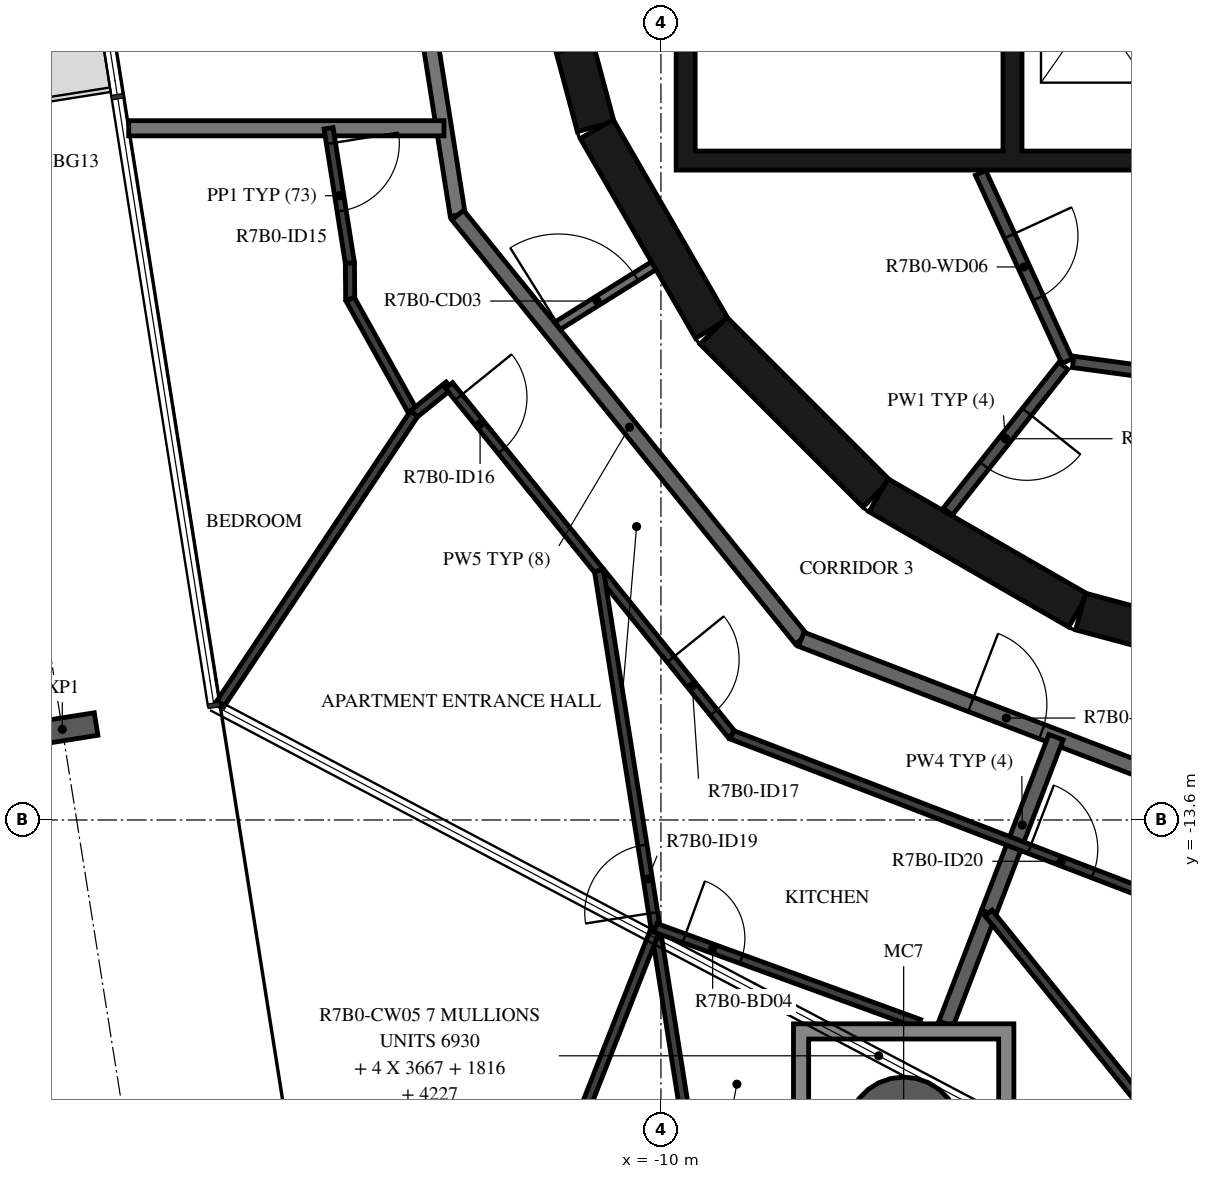
"""IFC4 building model, lengths in metres.
Left out: names, types, materials, properties, quantities, classifications, styles, units other than length and angle.
Written with IfcOpenShell. Run it as: python <this file> out.ifc"""

import sys

from ifc_helpers import new_model, si_unit, direction, frame, frame_2d, origin, origin_2d, place, context, subcontext, project, spatial, polyline, rectangle, hollow_circle, i_section, outline, extrude, element, fill, save


model = new_model("IFC4")
c1 = context("Model", 3, precision=1e-05, world=origin(), true_north=direction((0.0, 1.0)))
c2 = subcontext(c1, "Body", "Model", "MODEL_VIEW")
j1 = project(units=[si_unit("LENGTHUNIT", "METRE"), si_unit("PLANEANGLEUNIT", "RADIAN")], contexts=[c1])
p1 = place(None, origin())
s1 = spatial("IfcSite", under=j1, at=p1, CompositionType="ELEMENT")
p2 = place(p1, origin())
s2 = spatial("IfcBuilding", under=s1, at=p2, CompositionType="ELEMENT")
p3 = place(p2, frame((0.0, 0.0, 277.4)))
s3 = spatial("IfcBuildingStorey", under=s2, at=p3, CompositionType="ELEMENT", Elevation=277.4)
p4 = place(p3, frame((-6.807, -17.732, -0.38), z_axis=(0.0, 0.0, 1.0), x_axis=(1.0, 0.0, 0.0)))
e1 = element("IfcColumn", 1, at=p4, inside=s3, PredefinedType="COLUMN", context=c2, shape_type="SweptSolid", body=[
    extrude(hollow_circle(Radius=0.75, WallThickness=0.035, at=origin_2d()), origin(), (0.0, 0.0, 1.0), 3.5),
])
p5 = place(p3, frame((-17.875, -12.408, -0.38), z_axis=(0.0, 0.0, 1.0), x_axis=(-0.156434064006, 0.987688404113, 0.0)))
e2 = element("IfcColumn", 2, at=p5, inside=s3, PredefinedType="COLUMN", context=c2, shape_type="SweptSolid", body=[
    extrude(i_section(OverallWidth=0.3, OverallDepth=0.9, WebThickness=0.019, FlangeThickness=0.035, FilletRadius=0.03, at=origin_2d()), origin(), (0.0, 0.0, 1.0), 3.5),
])
p6 = place(p3, frame((-11.643, -1.55, 0.0), z_axis=(0.0, 0.0, 1.0), x_axis=(0.258734743916, -0.965948410781, 0.0)))
e3 = element("IfcWall", 3, at=p6, inside=s3, PredefinedType="SHEAR", context=c2, shape_type="SweptSolid", body=[
    extrude(rectangle(XDim=3.033, YDim=0.5, at=frame_2d((1.516, 0.0))), origin(), (0.0, 0.0, 1.0), 3.12),
])
p7 = place(p6, frame((1.066, 0.0, 0.0)))
e4 = element("IfcOpeningElement", 4, at=p7, cuts=e3, PredefinedType="OPENING", context=c2, shape_type="SweptSolid", body=[
    extrude(rectangle(XDim=0.9, YDim=2.1, at=frame_2d((0.45, 1.05))), frame((0.0, 0.26, 0.0), z_axis=(0.0, -1.0, 0.0), x_axis=(1.0, 0.0, 0.0)), (0.0, 0.0, 1.0), 0.52),
])
p8 = place(p3, frame((-10.845, -4.51, 0.0), z_axis=(0.0, 0.0, 1.0), x_axis=(0.500087131594, -0.865975092491, 0.0)))
e5 = element("IfcWall", 5, at=p8, inside=s3, PredefinedType="SHEAR", context=c2, shape_type="SweptSolid", body=[
    extrude(rectangle(XDim=3.033, YDim=0.5, at=frame_2d((1.516, 0.0))), origin(), (0.0, 0.0, 1.0), 3.12),
])
p9 = place(p3, frame((-9.308, -7.164, 0.0), z_axis=(0.0, 0.0, 1.0), x_axis=(0.707106781187, -0.707106781187, 0.0)))
e6 = element("IfcWall", 6, at=p9, inside=s3, PredefinedType="SHEAR", context=c2, shape_type="SweptSolid", body=[
    extrude(rectangle(XDim=3.032, YDim=0.5, at=frame_2d((1.516, 0.0))), origin(), (0.0, 0.0, 1.0), 3.12),
])
for number, where, z_axis, x_axis in (
    (7, (-7.137, -9.329, 0.0), (0.0, 0.0, 1.0), (0.866, -0.5, 0.0)),
    (8, (-4.479, -10.858, 0.0), (0.0, 0.0, 1.0), (0.966, -0.259, 0.0)),
):
    element("IfcWall", number, at=place(p3, frame(where, z_axis=z_axis, x_axis=x_axis)), inside=s3, PredefinedType="SHEAR", context=c2, shape_type="SweptSolid", body=[
        extrude(rectangle(XDim=3.033, YDim=0.5, at=frame_2d((1.516, 0.0))), origin(), (0.0, 0.0, 1.0), 3.12),
    ])
p10 = place(p3, origin())
e9 = element("IfcWall", 9, at=p10, inside=s3, PredefinedType="SHEAR", context=c2, shape_type="SweptSolid", body=[
    extrude(outline(polyline([(9.8, -5.05), (9.8, -4.8), (9.8, -1.9), (9.55, -1.9), (9.55, -4.8), (7.65, -4.8), (7.65, -1.9), (7.4, -1.9), (7.4, -4.8), (5.5, -4.8), (5.5, -1.9), (5.25, -1.9), (5.25, -4.8), (3.35, -4.8), (3.35, -1.9), (3.1, -1.9), (3.1, -4.8), (1.2, -4.8), (1.2, -1.9), (0.95, -1.9), (0.95, -4.8), (-0.95, -4.8), (-0.95, -1.9), (-1.2, -1.9), (-1.2, -4.8), (-3.1, -4.8), (-3.1, -1.9), (-3.35, -1.9), (-3.35, -4.8), (-5.25, -4.8), (-5.25, -1.9), (-5.5, -1.9), (-5.5, -4.8), (-9.55, -4.8), (-9.55, -1.9), (-9.8, -1.9), (-9.8, -4.8), (-9.8, -5.05), (9.8, -5.05)])), origin(), (0.0, 0.0, 1.0), 3.12),
])
p11 = place(p3, frame((-5.795, -5.086, 0.0), z_axis=(0.0, 0.0, 1.0), x_axis=(0.417887867606, -0.908498613157, 0.0)))
e10 = element("IfcWall", 10, at=p11, inside=s3, PredefinedType="PARTITIONING", context=c2, shape_type="SweptSolid", body=[
    extrude(rectangle(XDim=2.726, YDim=0.15, at=frame_2d((1.363, 0.0))), origin(), (0.0, 0.0, 1.0), 3.12),
])
p12 = place(p11, frame((0.913, 0.0, 0.0)))
e11 = element("IfcOpeningElement", 11, at=p12, cuts=e10, PredefinedType="OPENING", context=c2, shape_type="SweptSolid", body=[
    extrude(rectangle(XDim=0.9, YDim=2.1, at=frame_2d((0.45, 1.05))), frame((0.0, 0.085, 0.0), z_axis=(0.0, -1.0, 0.0), x_axis=(1.0, 0.0, 0.0)), (0.0, 0.0, 1.0), 0.17),
])
p13 = place(p3, frame((-4.706, -7.625, 0.0), z_axis=(0.0, 0.0, 1.0), x_axis=(-0.621392599334, -0.783499353856, 0.0)))
e12 = element("IfcWall", 12, at=p13, inside=s3, PredefinedType="PARTITIONING", context=c2, shape_type="SweptSolid", body=[
    extrude(rectangle(XDim=2.447, YDim=0.15, at=frame_2d((1.224, 0.0))), origin(), (0.0, 0.0, 1.0), 3.12),
])
p14 = place(p13, frame((0.774, 0.0, 0.0)))
e13 = element("IfcOpeningElement", 13, at=p14, cuts=e12, PredefinedType="OPENING", context=c2, shape_type="SweptSolid", body=[
    extrude(rectangle(XDim=0.9, YDim=2.1, at=frame_2d((0.45, 1.05))), frame((0.0, 0.085, 0.0), z_axis=(0.0, -1.0, 0.0), x_axis=(1.0, 0.0, 0.0)), (0.0, 0.0, 1.0), 0.17),
])
p15 = place(p3, frame((-2.42, -7.865, 0.0), z_axis=(0.0, 0.0, 1.0), x_axis=(-0.990972299108, 0.134066783362, 0.0)))
e14 = element("IfcWall", 14, at=p15, inside=s3, PredefinedType="PARTITIONING", context=c2, shape_type="SweptSolid", body=[
    extrude(rectangle(XDim=2.176, YDim=0.15, at=frame_2d((1.088, 0.0))), origin(), (0.0, 0.0, 1.0), 3.12),
])
p16 = place(p3, frame((-11.449, -7.154, 0.0), z_axis=(0.0, 0.0, 1.0), x_axis=(0.848067047543, 0.529888934468, 0.0)))
e15 = element("IfcWall", 15, at=p16, inside=s3, PredefinedType="PARTITIONING", context=c2, shape_type="SweptSolid", body=[
    extrude(rectangle(XDim=1.596, YDim=0.12, at=frame_2d((0.798, 0.0))), origin(), (0.0, 0.0, 1.0), 3.12),
])
p17 = place(p16, frame((0.12, 0.0, 0.0)))
e16 = element("IfcOpeningElement", 16, at=p17, cuts=e15, PredefinedType="OPENING", context=c2, shape_type="SweptSolid", body=[
    extrude(rectangle(XDim=1.2, YDim=2.1, at=frame_2d((0.6, 1.05))), frame((0.0, 0.07, 0.0), z_axis=(0.0, -1.0, 0.0), x_axis=(1.0, 0.0, 0.0)), (0.0, 0.0, 1.0), 0.14),
])
p18 = place(p3, frame((-13.797, 1.45, 0.0), z_axis=(0.0, 0.0, 1.0), x_axis=(0.156421704315, -0.987690361611, 0.0)))
e17 = element("IfcWall", 17, at=p18, inside=s3, PredefinedType="STANDARD", context=c2, shape_type="SweptSolid", body=[
    extrude(rectangle(XDim=7.181, YDim=0.2, at=frame_2d((3.591, 0.0))), origin(), (0.0, 0.0, 1.0), 3.12),
])
p19 = place(p3, frame((-12.673, -5.643, 0.0), z_axis=(0.0, 0.0, 1.0), x_axis=(0.629302871585, -0.777160148113, 0.0)))
e18 = element("IfcWall", 18, at=p19, inside=s3, PredefinedType="STANDARD", context=c2, shape_type="SweptSolid", body=[
    extrude(rectangle(XDim=7.181, YDim=0.2, at=frame_2d((3.59, 0.0))), origin(), (0.0, 0.0, 1.0), 3.12),
])
p20 = place(p3, frame((-8.154, -11.223, 0.0), z_axis=(0.0, 0.0, 1.0), x_axis=(0.93359073609, -0.358341090983, 0.0)))
e19 = element("IfcWall", 19, at=p20, inside=s3, PredefinedType="STANDARD", context=c2, shape_type="SweptSolid", body=[
    extrude(rectangle(XDim=7.181, YDim=0.2, at=frame_2d((3.59, 0.0))), origin(), (0.0, 0.0, 1.0), 3.12),
])
p21 = place(p20, frame((2.39, 0.0, 0.0)))
e20 = element("IfcOpeningElement", 20, at=p21, cuts=e19, PredefinedType="OPENING", context=c2, shape_type="SweptSolid", body=[
    extrude(rectangle(XDim=1.0, YDim=2.1, at=frame_2d((0.5, 1.05))), frame((0.0, 0.11, 0.0), z_axis=(0.0, -1.0, 0.0), x_axis=(1.0, 0.0, 0.0)), (0.0, 0.0, 1.0), 0.22),
])
p22 = place(p3, frame((-17.002, -4.5, 0.0), z_axis=(0.0, 0.0, 1.0), x_axis=(1.0, 0.0, 0.0)))
e21 = element("IfcWall", 21, at=p22, inside=s3, PredefinedType="STANDARD", context=c2, shape_type="SweptSolid", body=[
    extrude(rectangle(XDim=4.148, YDim=0.2, at=frame_2d((2.074, 0.0))), origin(), (0.0, 0.0, 1.0), 3.12),
])
p23 = place(p3, frame((-5.69, -14.824, 0.0), z_axis=(0.0, 0.0, 1.0), x_axis=(0.358345342952, 0.933589104041, 0.0)))
e22 = element("IfcWall", 22, at=p23, inside=s3, PredefinedType="STANDARD", context=c2, shape_type="SweptSolid", body=[
    extrude(rectangle(XDim=2.479, YDim=0.2, at=frame_2d((1.239, 0.0))), origin(), (0.0, 0.0, 1.0), 3.12),
])
p24 = place(p3, frame((-6.25, -16.282, 0.0), z_axis=(0.0, 0.0, 1.0), x_axis=(0.358360842469, 0.933583154617, 0.0)))
e23 = element("IfcWall", 23, at=p24, inside=s3, PredefinedType="STANDARD", context=c2, shape_type="SweptSolid", body=[
    extrude(rectangle(XDim=1.562, YDim=0.2, at=frame_2d((0.781, 0.0))), origin(), (0.0, 0.0, 1.0), 3.12),
])
p25 = place(p3, frame((-14.373, -4.5, 0.0), z_axis=(0.0, 0.0, 1.0), x_axis=(0.156437152886, -0.987687914878, 0.0)))
e24 = element("IfcWall", 24, at=p25, inside=s3, PredefinedType="PARTITIONING", context=c2, shape_type="SweptSolid", body=[
    extrude(rectangle(XDim=1.796, YDim=0.12, at=frame_2d((0.898, 0.0))), origin(), (0.0, 0.0, 1.0), 3.12),
])
p26 = place(p25, frame((0.2, 0.0, 0.0)))
e25 = element("IfcOpeningElement", 25, at=p26, cuts=e24, PredefinedType="OPENING", context=c2, shape_type="SweptSolid", body=[
    extrude(rectangle(XDim=0.9, YDim=2.1, at=frame_2d((0.45, 1.05))), frame((0.0, 0.07, 0.0), z_axis=(0.0, -1.0, 0.0), x_axis=(1.0, 0.0, 0.0)), (0.0, 0.0, 1.0), 0.14),
])
p27 = place(p3, frame((-14.092, -6.274, 0.0), z_axis=(0.0, 0.0, 1.0), x_axis=(0.008221715939, -0.999966201122, 0.0)))
e26 = element("IfcWall", 26, at=p27, inside=s3, PredefinedType="PARTITIONING", context=c2, shape_type="SweptSolid", body=[
    extrude(rectangle(XDim=0.475, YDim=0.12, at=frame_2d((0.238, 0.0))), origin(), (0.0, 0.0, 1.0), 3.12),
])
p28 = place(p3, frame((-14.088, -6.749, 0.0), z_axis=(0.0, 0.0, 1.0), x_axis=(0.486723752783, -0.873555944675, 0.0)))
e27 = element("IfcWall", 27, at=p28, inside=s3, PredefinedType="PARTITIONING", context=c2, shape_type="SweptSolid", body=[
    extrude(rectangle(XDim=1.726, YDim=0.12, at=frame_2d((0.863, 0.0))), origin(), (0.0, 0.0, 1.0), 3.12),
])
p29 = place(p3, frame((-13.248, -8.257, 0.0), z_axis=(0.0, 0.0, 1.0), x_axis=(0.777071947771, 0.629411779352, 0.0)))
e28 = element("IfcWall", 28, at=p29, inside=s3, PredefinedType="PARTITIONING", context=c2, shape_type="SweptSolid", body=[
    extrude(rectangle(XDim=0.592, YDim=0.12, at=frame_2d((0.296, 0.0))), origin(), (0.0, 0.0, 1.0), 3.12),
])
p30 = place(p3, frame((-12.788, -7.884, 0.0), z_axis=(0.0, 0.0, 1.0), x_axis=(0.6293312414, -0.777137174891, 0.0)))
e29 = element("IfcWall", 29, at=p30, inside=s3, PredefinedType="PARTITIONING", context=c2, shape_type="SweptSolid", body=[
    extrude(rectangle(XDim=5.913, YDim=0.12, at=frame_2d((2.957, 0.0))), origin(), (0.0, 0.0, 1.0), 3.12),
])
p31 = place(p30, frame((0.2, 0.0, 0.0)))
e30 = element("IfcOpeningElement", 30, at=p31, cuts=e29, PredefinedType="OPENING", context=c2, shape_type="SweptSolid", body=[
    extrude(rectangle(XDim=0.9, YDim=2.1, at=frame_2d((0.45, 1.05))), frame((0.0, 0.07, 0.0), z_axis=(0.0, -1.0, 0.0), x_axis=(1.0, 0.0, 0.0)), (0.0, 0.0, 1.0), 0.14),
])
p32 = place(p30, frame((4.635, 0.0, 0.0)))
e31 = element("IfcOpeningElement", 31, at=p32, cuts=e29, PredefinedType="OPENING", context=c2, shape_type="SweptSolid", body=[
    extrude(rectangle(XDim=0.9, YDim=2.1, at=frame_2d((0.45, 1.05))), frame((0.0, 0.07, 0.0), z_axis=(0.0, -1.0, 0.0), x_axis=(1.0, 0.0, 0.0)), (0.0, 0.0, 1.0), 0.14),
])
p33 = place(p3, frame((-9.067, -12.479, 0.0), z_axis=(0.0, 0.0, 1.0), x_axis=(0.933579449035, -0.358370495911, 0.0)))
e32 = element("IfcWall", 32, at=p33, inside=s3, PredefinedType="PARTITIONING", context=c2, shape_type="SweptSolid", body=[
    extrude(rectangle(XDim=7.985, YDim=0.12, at=frame_2d((3.992, 0.0))), origin(), (0.0, 0.0, 1.0), 3.12),
])
p34 = place(p33, frame((4.192, 0.0, 0.0)))
e33 = element("IfcOpeningElement", 33, at=p34, cuts=e32, PredefinedType="OPENING", context=c2, shape_type="SweptSolid", body=[
    extrude(rectangle(XDim=0.9, YDim=2.1, at=frame_2d((0.45, 1.05))), frame((0.0, 0.07, 0.0), z_axis=(0.0, -1.0, 0.0), x_axis=(1.0, 0.0, 0.0)), (0.0, 0.0, 1.0), 0.14),
])
p35 = place(p3, frame((-15.802, -12.08, 0.0), z_axis=(0.0, 0.0, 1.0), x_axis=(0.555386305099, 0.831592479589, 0.0)))
e34 = element("IfcWall", 34, at=p35, inside=s3, PredefinedType="PARTITIONING", context=c2, shape_type="SweptSolid", body=[
    extrude(rectangle(XDim=4.597, YDim=0.12, at=frame_2d((2.299, 0.0))), origin(), (0.0, 0.0, 1.0), 3.12),
])
p36 = place(p3, frame((-9.619, -17.871, 0.0), z_axis=(0.0, 0.0, 1.0), x_axis=(-0.156433255633, 0.987688532146, 0.0)))
e35 = element("IfcWall", 35, at=p36, inside=s3, PredefinedType="PARTITIONING", context=c2, shape_type="SweptSolid", body=[
    extrude(rectangle(XDim=7.644, YDim=0.12, at=frame_2d((3.822, 0.0))), origin(), (0.0, 0.0, 1.0), 3.12),
])
p37 = place(p36, frame((3.087, 0.0, 0.0)))
e36 = element("IfcOpeningElement", 36, at=p37, cuts=e35, PredefinedType="OPENING", context=c2, shape_type="SweptSolid", body=[
    extrude(rectangle(XDim=0.9, YDim=2.1, at=frame_2d((0.45, 1.05))), frame((0.0, 0.07, 0.0), z_axis=(0.0, -1.0, 0.0), x_axis=(1.0, 0.0, 0.0)), (0.0, 0.0, 1.0), 0.14),
])
p38 = place(p3, frame((-13.067, -22.658, 0.0), z_axis=(0.0, 0.0, 1.0), x_axis=(0.365785999331, 0.930698986082, 0.0)))
e37 = element("IfcWall", 37, at=p38, inside=s3, PredefinedType="PARTITIONING", context=c2, shape_type="SweptSolid", body=[
    extrude(rectangle(XDim=8.196, YDim=0.12, at=frame_2d((4.098, 0.0))), origin(), (0.0, 0.0, 1.0), 3.12),
])
p39 = place(p38, frame((0.5, 0.0, 0.0)))
e38 = element("IfcOpeningElement", 38, at=p39, cuts=e37, PredefinedType="OPENING", context=c2, shape_type="SweptSolid", body=[
    extrude(rectangle(XDim=0.9, YDim=2.1, at=frame_2d((0.45, 1.05))), frame((0.0, 0.07, 0.0), z_axis=(0.0, -1.0, 0.0), x_axis=(1.0, 0.0, 0.0)), (0.0, 0.0, 1.0), 0.14),
])
p40 = place(p3, frame((-10.071, -15.019, 0.0), z_axis=(0.0, 0.0, 1.0), x_axis=(0.939648507355, -0.34214131967, 0.0)))
e39 = element("IfcWall", 39, at=p40, inside=s3, PredefinedType="PARTITIONING", context=c2, shape_type="SweptSolid", body=[
    extrude(rectangle(XDim=3.691, YDim=0.12, at=frame_2d((1.846, 0.0))), origin(), (0.0, 0.0, 1.0), 3.12),
])
p41 = place(p40, frame((0.4, 0.0, 0.0)))
e40 = element("IfcOpeningElement", 40, at=p41, cuts=e39, PredefinedType="OPENING", context=c2, shape_type="SweptSolid", body=[
    extrude(rectangle(XDim=0.8, YDim=2.1, at=frame_2d((0.4, 1.05))), frame((0.0, 0.07, 0.0), z_axis=(0.0, -1.0, 0.0), x_axis=(1.0, 0.0, 0.0)), (0.0, 0.0, 1.0), 0.14),
])
p42 = place(p3, frame((-4.809, -19.717, 0.0), z_axis=(0.0, 0.0, 1.0), x_axis=(0.777140730041, 0.629326851255, 0.0)))
e41 = element("IfcWall", 41, at=p42, inside=s3, PredefinedType="PARTITIONING", context=c2, shape_type="SweptSolid", body=[
    extrude(rectangle(XDim=7.644, YDim=0.12, at=frame_2d((3.822, 0.0))), origin(), (0.0, 0.0, 1.0), 3.12),
])
p43 = place(p42, frame((2.594, 0.0, 0.0)))
e42 = element("IfcOpeningElement", 42, at=p43, cuts=e41, PredefinedType="OPENING", context=c2, shape_type="SweptSolid", body=[
    extrude(rectangle(XDim=0.9, YDim=2.1, at=frame_2d((0.45, 1.05))), frame((0.0, 0.07, 0.0), z_axis=(0.0, -1.0, 0.0), x_axis=(1.0, 0.0, 0.0)), (0.0, 0.0, 1.0), 0.14),
])
p44 = place(p42, frame((0.3, 0.0, 0.0)))
e43 = element("IfcOpeningElement", 43, at=p44, cuts=e41, PredefinedType="OPENING", context=c2, shape_type="SweptSolid", body=[
    extrude(rectangle(XDim=0.8, YDim=2.1, at=frame_2d((0.4, 1.05))), frame((0.0, 0.07, 0.0), z_axis=(0.0, -1.0, 0.0), x_axis=(1.0, 0.0, 0.0)), (0.0, 0.0, 1.0), 0.14),
])
p45 = place(p42, frame((4.319, 0.0, 0.0)))
e44 = element("IfcOpeningElement", 44, at=p45, cuts=e41, PredefinedType="OPENING", context=c2, shape_type="SweptSolid", body=[
    extrude(rectangle(XDim=0.9, YDim=2.1, at=frame_2d((0.45, 1.05))), frame((0.0, 0.07, 0.0), z_axis=(0.0, -1.0, 0.0), x_axis=(1.0, 0.0, 0.0)), (0.0, 0.0, 1.0), 0.14),
])
p46 = place(p3, frame((-2.948, -18.21, 0.0), z_axis=(0.0, 0.0, 1.0), x_axis=(-0.629330389268, 0.777137864953, 0.0)))
e45 = element("IfcWall", 45, at=p46, inside=s3, PredefinedType="PARTITIONING", context=c2, shape_type="SweptSolid", body=[
    extrude(rectangle(XDim=4.357, YDim=0.12, at=frame_2d((2.179, 0.0))), origin(), (0.0, 0.0, 1.0), 3.12),
])
p47 = place(p3, origin())
e46 = element("IfcWall", 46, at=p47, inside=s3, PredefinedType="STANDARD", context=c2, shape_type="SweptSolid", body=[
    extrude(outline(polyline([(-5.357, -16.282), (-5.357, -19.182), (-8.257, -19.182), (-8.257, -16.282), (-5.357, -16.282)]), holes=[polyline([(-8.057, -18.982), (-5.557, -18.982), (-5.557, -16.482), (-8.057, -16.482), (-8.057, -18.982)])]), origin(), (0.0, 0.0, 1.0), 3.12),
])
p48 = place(p12, origin())
e47 = element("IfcDoor", 47, at=p48, inside=s3, OperationType="SINGLE_SWING_RIGHT", PredefinedType="DOOR", context=c2, shape_type="SweptSolid", body=[
    extrude(rectangle(XDim=0.9, YDim=2.1, at=frame_2d((0.45, 1.05))), frame((0.0, 0.025, 0.0), z_axis=(0.0, -1.0, 0.0), x_axis=(1.0, 0.0, 0.0)), (0.0, 0.0, 1.0), 0.05),
])
fill(e11, e47)
p49 = place(p14, origin())
e48 = element("IfcDoor", 48, at=p49, inside=s3, OperationType="SINGLE_SWING_LEFT", PredefinedType="DOOR", context=c2, shape_type="SweptSolid", body=[
    extrude(rectangle(XDim=0.9, YDim=2.1, at=frame_2d((0.45, 1.05))), frame((0.0, 0.025, 0.0), z_axis=(0.0, -1.0, 0.0), x_axis=(1.0, 0.0, 0.0)), (0.0, 0.0, 1.0), 0.05),
])
fill(e13, e48)
p50 = place(p21, origin())
e49 = element("IfcDoor", 49, at=p50, inside=s3, OperationType="SINGLE_SWING_RIGHT", PredefinedType="DOOR", context=c2, shape_type="SweptSolid", body=[
    extrude(rectangle(XDim=1.0, YDim=2.1, at=frame_2d((0.5, 1.05))), frame((0.0, 0.025, 0.0), z_axis=(0.0, -1.0, 0.0), x_axis=(1.0, 0.0, 0.0)), (0.0, 0.0, 1.0), 0.05),
])
fill(e20, e49)
p51 = place(p26, origin())
e50 = element("IfcDoor", 50, at=p51, inside=s3, OperationType="SINGLE_SWING_RIGHT", PredefinedType="DOOR", context=c2, shape_type="SweptSolid", body=[
    extrude(rectangle(XDim=0.9, YDim=2.1, at=frame_2d((0.45, 1.05))), frame((0.0, 0.025, 0.0), z_axis=(0.0, -1.0, 0.0), x_axis=(1.0, 0.0, 0.0)), (0.0, 0.0, 1.0), 0.05),
])
fill(e25, e50)
p52 = place(p31, origin())
e51 = element("IfcDoor", 51, at=p52, inside=s3, OperationType="SINGLE_SWING_RIGHT", PredefinedType="DOOR", context=c2, shape_type="SweptSolid", body=[
    extrude(rectangle(XDim=0.9, YDim=2.1, at=frame_2d((0.45, 1.05))), frame((0.0, 0.025, 0.0), z_axis=(0.0, -1.0, 0.0), x_axis=(1.0, 0.0, 0.0)), (0.0, 0.0, 1.0), 0.05),
])
fill(e30, e51)
p53 = place(p32, origin())
e52 = element("IfcDoor", 52, at=p53, inside=s3, OperationType="SINGLE_SWING_RIGHT", PredefinedType="DOOR", context=c2, shape_type="SweptSolid", body=[
    extrude(rectangle(XDim=0.9, YDim=2.1, at=frame_2d((0.45, 1.05))), frame((0.0, 0.025, 0.0), z_axis=(0.0, -1.0, 0.0), x_axis=(1.0, 0.0, 0.0)), (0.0, 0.0, 1.0), 0.05),
])
fill(e31, e52)
p54 = place(p41, origin())
e53 = element("IfcDoor", 53, at=p54, inside=s3, OperationType="SINGLE_SWING_RIGHT", PredefinedType="DOOR", context=c2, shape_type="SweptSolid", body=[
    extrude(rectangle(XDim=0.8, YDim=2.1, at=frame_2d((0.4, 1.05))), frame((0.0, 0.025, 0.0), z_axis=(0.0, -1.0, 0.0), x_axis=(1.0, 0.0, 0.0)), (0.0, 0.0, 1.0), 0.05),
])
fill(e40, e53)
p55 = place(p37, origin())
e54 = element("IfcDoor", 54, at=p55, inside=s3, OperationType="SINGLE_SWING_LEFT", PredefinedType="DOOR", context=c2, shape_type="SweptSolid", body=[
    extrude(rectangle(XDim=0.9, YDim=2.1, at=frame_2d((0.45, 1.05))), frame((0.0, 0.025, 0.0), z_axis=(0.0, -1.0, 0.0), x_axis=(1.0, 0.0, 0.0)), (0.0, 0.0, 1.0), 0.05),
])
fill(e36, e54)
p56 = place(p34, origin())
e55 = element("IfcDoor", 55, at=p56, inside=s3, OperationType="SINGLE_SWING_RIGHT", PredefinedType="DOOR", context=c2, shape_type="SweptSolid", body=[
    extrude(rectangle(XDim=0.9, YDim=2.1, at=frame_2d((0.45, 1.05))), frame((0.0, 0.025, 0.0), z_axis=(0.0, -1.0, 0.0), x_axis=(1.0, 0.0, 0.0)), (0.0, 0.0, 1.0), 0.05),
])
fill(e33, e55)
p57 = place(p17, origin())
e56 = element("IfcDoor", 56, at=p57, inside=s3, OperationType="DOUBLE_DOOR_SINGLE_SWING", PredefinedType="DOOR", context=c2, shape_type="SweptSolid", body=[
    extrude(rectangle(XDim=1.2, YDim=2.1, at=frame_2d((0.6, 1.05))), frame((0.0, 0.025, 0.0), z_axis=(0.0, -1.0, 0.0), x_axis=(1.0, 0.0, 0.0)), (0.0, 0.0, 1.0), 0.05),
])
fill(e16, e56)
save(model, sys.argv[1])
